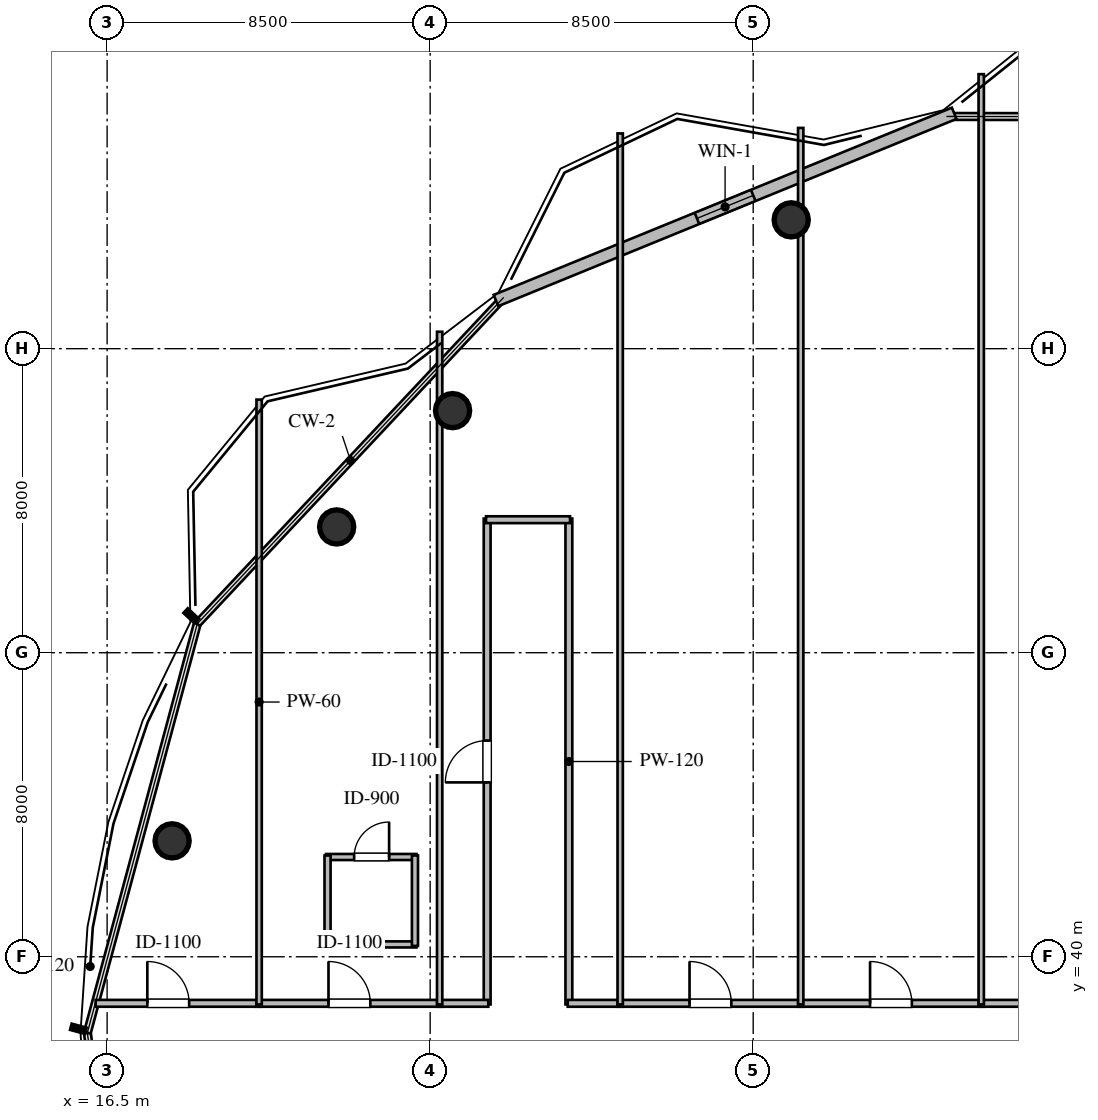
"""IFC4 building model, lengths in metres.
Left out: names, types, materials, properties, quantities, classifications, styles, units other than length and angle.
Written with IfcOpenShell. Run it as: python <this file> out.ifc"""

import sys

from ifc_helpers import new_model, si_unit, direction, frame, frame_2d, origin, origin_2d, place, context, subcontext, project, spatial, rectangle, circle, extrude, element, fill, save


model = new_model("IFC4")
c1 = context("Model", 3, precision=1e-05, world=origin(), true_north=direction((0.0, 1.0)))
c2 = subcontext(c1, "Body", "Model", "MODEL_VIEW")
j1 = project(units=[si_unit("LENGTHUNIT", "METRE"), si_unit("PLANEANGLEUNIT", "RADIAN")], contexts=[c1])
p1 = place(None, origin())
s1 = spatial("IfcSite", under=j1, at=p1, CompositionType="ELEMENT")
p2 = place(p1, origin())
s2 = spatial("IfcBuilding", under=s1, at=p2, CompositionType="ELEMENT")
p3 = place(p2, frame((0.0, 0.0, 266.2)))
s3 = spatial("IfcBuildingStorey", under=s2, at=p3, CompositionType="ELEMENT", Elevation=266.2)
for number, where, z_axis, x_axis in (
    (1, (34.5, 59.39, 0.0), (0.0, 0.0, 1.0), (1.0, 0.0, 0.0)),
    (2, (25.59, 54.37, 0.0), (0.0, 0.0, 1.0), (1.0, 0.0, 0.0)),
    (3, (22.54, 51.31, 0.0), (0.0, 0.0, 1.0), (1.0, 0.0, 0.0)),
    (4, (18.21, 43.05, 0.0), (0.0, 0.0, 1.0), (1.0, 0.0, 0.0)),
):
    element("IfcColumn", number, at=place(p3, frame(where, z_axis=z_axis, x_axis=x_axis)), inside=s3, PredefinedType="COLUMN", context=c2, shape_type="SweptSolid", body=[
        extrude(circle(Radius=0.45, at=origin_2d()), origin(), (0.0, 0.0, 1.0), 3.8),
    ])
p4 = place(p3, frame((26.732, 57.267, 0.0), z_axis=(0.0, 0.0, 1.0), x_axis=(0.925709313248, 0.37823572989, 0.0)))
e5 = element("IfcWall", 5, at=p4, inside=s3, PredefinedType="STANDARD", context=c2, shape_type="SweptSolid", body=[
    extrude(rectangle(XDim=13.024, YDim=0.32, at=frame_2d((6.512, 0.0))), origin(), (0.0, 0.0, 1.0), 3.56),
])
p5 = place(p4, frame((5.712, 0.0, 1.05)))
e6 = element("IfcOpeningElement", 6, at=p5, cuts=e5, PredefinedType="OPENING", context=c2, shape_type="SweptSolid", body=[
    extrude(rectangle(XDim=1.6, YDim=1.5, at=frame_2d((0.8, 0.75))), frame((0.0, 0.17, 0.0), z_axis=(0.0, -1.0, 0.0), x_axis=(1.0, 0.0, 0.0)), (0.0, 0.0, 1.0), 0.34),
])
p6 = place(p3, frame((22.26, 40.325, 0.0), z_axis=(0.0, 0.0, 1.0), x_axis=(1.0, 0.0, 0.0)))
e7 = element("IfcWall", 7, at=p6, inside=s3, PredefinedType="PLUMBINGWALL", context=c2, shape_type="SweptSolid", body=[
    extrude(rectangle(XDim=2.38, YDim=0.16, at=frame_2d((1.19, 0.0))), origin(), (0.0, 0.0, 1.0), 3.56),
])
p7 = place(p3, frame((22.26, 42.625, 0.0), z_axis=(0.0, 0.0, 1.0), x_axis=(1.0, 0.0, 0.0)))
e8 = element("IfcWall", 8, at=p7, inside=s3, PredefinedType="PLUMBINGWALL", context=c2, shape_type="SweptSolid", body=[
    extrude(rectangle(XDim=2.38, YDim=0.16, at=frame_2d((1.19, 0.0))), origin(), (0.0, 0.0, 1.0), 3.56),
])
p8 = place(p7, frame((0.74, 0.0, 0.0)))
e9 = element("IfcOpeningElement", 9, at=p8, cuts=e8, PredefinedType="OPENING", context=c2, shape_type="SweptSolid", body=[
    extrude(rectangle(XDim=0.92, YDim=2.1, at=frame_2d((0.46, 1.05))), frame((0.0, 0.09, 0.0), z_axis=(0.0, -1.0, 0.0), x_axis=(1.0, 0.0, 0.0)), (0.0, 0.0, 1.0), 0.18),
])
p9 = place(p3, frame((22.3, 40.285, 0.0), z_axis=(0.0, 0.0, 1.0), x_axis=(0.0, 1.0, 0.0)))
e10 = element("IfcWall", 10, at=p9, inside=s3, PredefinedType="PLUMBINGWALL", context=c2, shape_type="SweptSolid", body=[
    extrude(rectangle(XDim=2.38, YDim=0.16, at=frame_2d((1.19, 0.0))), origin(), (0.0, 0.0, 1.0), 3.006),
])
p10 = place(p3, frame((24.6, 40.285, 0.0), z_axis=(0.0, 0.0, 1.0), x_axis=(0.0, 1.0, 0.0)))
e11 = element("IfcWall", 11, at=p10, inside=s3, PredefinedType="PLUMBINGWALL", context=c2, shape_type="SweptSolid", body=[
    extrude(rectangle(XDim=2.38, YDim=0.16, at=frame_2d((1.19, 0.0))), origin(), (0.0, 0.0, 1.0), 3.56),
])
p11 = place(p3, frame((16.198, 38.775, 0.0), z_axis=(0.0, 0.0, 1.0), x_axis=(1.0, 0.0, 0.0)))
e12 = element("IfcWall", 12, at=p11, inside=s3, PredefinedType="PARTITIONING", context=c2, shape_type="SweptSolid", body=[
    extrude(rectangle(XDim=4.367, YDim=0.18, at=frame_2d((2.183, 0.0))), origin(), (0.0, 0.0, 1.0), 3.56),
])
p12 = place(p11, frame((1.36, 0.0, 0.0)))
e13 = element("IfcOpeningElement", 13, at=p12, cuts=e12, PredefinedType="OPENING", context=c2, shape_type="SweptSolid", body=[
    extrude(rectangle(XDim=1.1, YDim=2.1, at=frame_2d((0.55, 1.05))), frame((0.0, 0.1, 0.0), z_axis=(0.0, -1.0, 0.0), x_axis=(1.0, 0.0, 0.0)), (0.0, 0.0, 1.0), 0.2),
])
p13 = place(p3, frame((20.435, 38.775, 0.0), z_axis=(0.0, 0.0, 1.0), x_axis=(1.0, 0.0, 0.0)))
e14 = element("IfcWall", 14, at=p13, inside=s3, PredefinedType="PARTITIONING", context=c2, shape_type="SweptSolid", body=[
    extrude(rectangle(XDim=4.88, YDim=0.18, at=frame_2d((2.44, 0.0))), origin(), (0.0, 0.0, 1.0), 3.56),
])
p14 = place(p13, frame((1.89, 0.0, 0.0)))
e15 = element("IfcOpeningElement", 15, at=p14, cuts=e14, PredefinedType="OPENING", context=c2, shape_type="SweptSolid", body=[
    extrude(rectangle(XDim=1.1, YDim=2.1, at=frame_2d((0.55, 1.05))), frame((0.0, 0.1, 0.0), z_axis=(0.0, -1.0, 0.0), x_axis=(1.0, 0.0, 0.0)), (0.0, 0.0, 1.0), 0.2),
])
p15 = place(p3, frame((26.5, 38.745, 0.0), z_axis=(0.0, 0.0, 1.0), x_axis=(0.0, 1.0, 0.0)))
e16 = element("IfcWall", 16, at=p15, inside=s3, PredefinedType="PARTITIONING", context=c2, shape_type="SweptSolid", body=[
    extrude(rectangle(XDim=12.785, YDim=0.18, at=frame_2d((6.393, 0.0))), origin(), (0.0, 0.0, 1.0), 3.56),
])
p16 = place(p15, frame((5.843, 0.0, 0.0)))
e17 = element("IfcOpeningElement", 17, at=p16, cuts=e16, PredefinedType="OPENING", context=c2, shape_type="SweptSolid", body=[
    extrude(rectangle(XDim=1.1, YDim=2.1, at=frame_2d((0.55, 1.05))), frame((0.0, 0.1, 0.0), z_axis=(0.0, -1.0, 0.0), x_axis=(1.0, 0.0, 0.0)), (0.0, 0.0, 1.0), 0.2),
])
p17 = place(p3, frame((28.65, 51.53, 0.0), z_axis=(0.0, 0.0, 1.0), x_axis=(0.0, -1.0, 0.0)))
e18 = element("IfcWall", 18, at=p17, inside=s3, PredefinedType="PARTITIONING", context=c2, shape_type="SweptSolid", body=[
    extrude(rectangle(XDim=12.785, YDim=0.18, at=frame_2d((6.393, 0.0))), origin(), (0.0, 0.0, 1.0), 3.56),
])
p18 = place(p3, frame((26.47, 51.5, 0.0), z_axis=(0.0, 0.0, 1.0), x_axis=(1.0, 0.0, 0.0)))
e19 = element("IfcWall", 19, at=p18, inside=s3, PredefinedType="PARTITIONING", context=c2, shape_type="SweptSolid", body=[
    extrude(rectangle(XDim=2.21, YDim=0.18, at=frame_2d((1.105, 0.0))), origin(), (0.0, 0.0, 1.0), 3.56),
])
p19 = place(p3, frame((28.62, 38.775, 0.0), z_axis=(0.0, 0.0, 1.0), x_axis=(1.0, 0.0, 0.0)))
e20 = element("IfcWall", 20, at=p19, inside=s3, PredefinedType="PARTITIONING", context=c2, shape_type="SweptSolid", body=[
    extrude(rectangle(XDim=1.445, YDim=0.18, at=frame_2d((0.722, 0.0))), origin(), (0.0, 0.0, 1.0), 3.56),
])
p20 = place(p3, frame((25.185, 38.775, 0.0), z_axis=(0.0, 0.0, 1.0), x_axis=(1.0, 0.0, 0.0)))
e21 = element("IfcWall", 21, at=p20, inside=s3, PredefinedType="PARTITIONING", context=c2, shape_type="SweptSolid", body=[
    extrude(rectangle(XDim=1.345, YDim=0.18, at=frame_2d((0.672, 0.0))), origin(), (0.0, 0.0, 1.0), 3.56),
])
p21 = place(p3, frame((29.935, 38.775, 0.0), z_axis=(0.0, 0.0, 1.0), x_axis=(1.0, 0.0, 0.0)))
e22 = element("IfcWall", 22, at=p21, inside=s3, PredefinedType="PARTITIONING", context=c2, shape_type="SweptSolid", body=[
    extrude(rectangle(XDim=4.88, YDim=0.18, at=frame_2d((2.44, 0.0))), origin(), (0.0, 0.0, 1.0), 3.56),
])
p22 = place(p21, frame((1.89, 0.0, 0.0)))
e23 = element("IfcOpeningElement", 23, at=p22, cuts=e22, PredefinedType="OPENING", context=c2, shape_type="SweptSolid", body=[
    extrude(rectangle(XDim=1.1, YDim=2.1, at=frame_2d((0.55, 1.05))), frame((0.0, 0.1, 0.0), z_axis=(0.0, -1.0, 0.0), x_axis=(1.0, 0.0, 0.0)), (0.0, 0.0, 1.0), 0.2),
])
p23 = place(p3, frame((34.685, 38.775, 0.0), z_axis=(0.0, 0.0, 1.0), x_axis=(1.0, 0.0, 0.0)))
e24 = element("IfcWall", 24, at=p23, inside=s3, PredefinedType="PARTITIONING", context=c2, shape_type="SweptSolid", body=[
    extrude(rectangle(XDim=4.88, YDim=0.18, at=frame_2d((2.44, 0.0))), origin(), (0.0, 0.0, 1.0), 3.56),
])
p24 = place(p23, frame((1.89, 0.0, 0.0)))
e25 = element("IfcOpeningElement", 25, at=p24, cuts=e24, PredefinedType="OPENING", context=c2, shape_type="SweptSolid", body=[
    extrude(rectangle(XDim=1.1, YDim=2.1, at=frame_2d((0.55, 1.05))), frame((0.0, 0.1, 0.0), z_axis=(0.0, -1.0, 0.0), x_axis=(1.0, 0.0, 0.0)), (0.0, 0.0, 1.0), 0.2),
])
p25 = place(p3, frame((39.435, 38.775, 0.0), z_axis=(0.0, 0.0, 1.0), x_axis=(1.0, 0.0, 0.0)))
e26 = element("IfcWall", 26, at=p25, inside=s3, PredefinedType="PARTITIONING", context=c2, shape_type="SweptSolid", body=[
    extrude(rectangle(XDim=7.23, YDim=0.18, at=frame_2d((3.615, 0.0))), origin(), (0.0, 0.0, 1.0), 3.56),
])
p26 = place(p25, frame((3.065, 0.0, 0.0)))
e27 = element("IfcOpeningElement", 27, at=p26, cuts=e26, PredefinedType="OPENING", context=c2, shape_type="SweptSolid", body=[
    extrude(rectangle(XDim=1.1, YDim=2.1, at=frame_2d((0.55, 1.05))), frame((0.0, 0.1, 0.0), z_axis=(0.0, -1.0, 0.0), x_axis=(1.0, 0.0, 0.0)), (0.0, 0.0, 1.0), 0.2),
])
p27 = place(p3, frame((20.5, 54.66, 0.0), z_axis=(0.0, 0.0, 1.0), x_axis=(0.0, -1.0, 0.0)))
e28 = element("IfcWall", 28, at=p27, inside=s3, PredefinedType="PARTITIONING", context=c2, shape_type="SweptSolid", body=[
    extrude(rectangle(XDim=15.915, YDim=0.14, at=frame_2d((7.958, 0.0))), origin(), (0.0, 0.0, 1.0), 3.56),
])
p28 = place(p3, frame((25.25, 56.445, 0.0), z_axis=(0.0, 0.0, 1.0), x_axis=(0.0, -1.0, 0.0)))
e29 = element("IfcWall", 29, at=p28, inside=s3, PredefinedType="PARTITIONING", context=c2, shape_type="SweptSolid", body=[
    extrude(rectangle(XDim=17.7, YDim=0.14, at=frame_2d((8.85, 0.0))), origin(), (0.0, 0.0, 1.0), 3.006),
])
p29 = place(p3, frame((30.0, 61.664, 0.0), z_axis=(0.0, 0.0, 1.0), x_axis=(0.0, -1.0, 0.0)))
e30 = element("IfcWall", 30, at=p29, inside=s3, PredefinedType="PARTITIONING", context=c2, shape_type="SweptSolid", body=[
    extrude(rectangle(XDim=22.919, YDim=0.14, at=frame_2d((11.459, 0.0))), origin(), (0.0, 0.0, 1.0), 3.56),
])
p30 = place(p3, frame((34.75, 61.808, 0.0), z_axis=(0.0, 0.0, 1.0), x_axis=(0.0, -1.0, 0.0)))
e31 = element("IfcWall", 31, at=p30, inside=s3, PredefinedType="PARTITIONING", context=c2, shape_type="SweptSolid", body=[
    extrude(rectangle(XDim=23.063, YDim=0.14, at=frame_2d((11.531, 0.0))), origin(), (0.0, 0.0, 1.0), 3.006),
])
p31 = place(p3, frame((39.5, 63.223, 0.0), z_axis=(0.0, 0.0, 1.0), x_axis=(0.0, -1.0, 0.0)))
e32 = element("IfcWall", 32, at=p31, inside=s3, PredefinedType="PARTITIONING", context=c2, shape_type="SweptSolid", body=[
    extrude(rectangle(XDim=24.478, YDim=0.14, at=frame_2d((12.239, 0.0))), origin(), (0.0, 0.0, 1.0), 3.56),
])
p32 = place(p5, origin())
e33 = element("IfcWindow", 33, at=p32, inside=s3, PartitioningType="SINGLE_PANEL", PredefinedType="WINDOW", context=c2, shape_type="SweptSolid", body=[
    extrude(rectangle(XDim=1.6, YDim=1.5, at=frame_2d((0.8, 0.75))), frame((0.0, 0.03, 0.0), z_axis=(0.0, -1.0, 0.0), x_axis=(1.0, 0.0, 0.0)), (0.0, 0.0, 1.0), 0.06),
])
fill(e6, e33)
p33 = place(p8, origin())
e34 = element("IfcDoor", 34, at=p33, inside=s3, OperationType="SINGLE_SWING_RIGHT", PredefinedType="DOOR", context=c2, shape_type="SweptSolid", body=[
    extrude(rectangle(XDim=0.92, YDim=2.1, at=frame_2d((0.46, 1.05))), frame((0.0, 0.025, 0.0), z_axis=(0.0, -1.0, 0.0), x_axis=(1.0, 0.0, 0.0)), (0.0, 0.0, 1.0), 0.05),
])
fill(e9, e34)
p34 = place(p12, origin())
e35 = element("IfcDoor", 35, at=p34, inside=s3, OperationType="SINGLE_SWING_LEFT", PredefinedType="DOOR", context=c2, shape_type="SweptSolid", body=[
    extrude(rectangle(XDim=1.1, YDim=2.1, at=frame_2d((0.55, 1.05))), frame((0.0, 0.025, 0.0), z_axis=(0.0, -1.0, 0.0), x_axis=(1.0, 0.0, 0.0)), (0.0, 0.0, 1.0), 0.05),
])
fill(e13, e35)
p35 = place(p14, origin())
e36 = element("IfcDoor", 36, at=p35, inside=s3, OperationType="SINGLE_SWING_LEFT", PredefinedType="DOOR", context=c2, shape_type="SweptSolid", body=[
    extrude(rectangle(XDim=1.1, YDim=2.1, at=frame_2d((0.55, 1.05))), frame((0.0, 0.025, 0.0), z_axis=(0.0, -1.0, 0.0), x_axis=(1.0, 0.0, 0.0)), (0.0, 0.0, 1.0), 0.05),
])
fill(e15, e36)
p36 = place(p16, origin())
e37 = element("IfcDoor", 37, at=p36, inside=s3, OperationType="SINGLE_SWING_LEFT", PredefinedType="DOOR", context=c2, shape_type="SweptSolid", body=[
    extrude(rectangle(XDim=1.1, YDim=2.1, at=frame_2d((0.55, 1.05))), frame((0.0, 0.025, 0.0), z_axis=(0.0, -1.0, 0.0), x_axis=(1.0, 0.0, 0.0)), (0.0, 0.0, 1.0), 0.05),
])
fill(e17, e37)
p37 = place(p22, origin())
e38 = element("IfcDoor", 38, at=p37, inside=s3, OperationType="SINGLE_SWING_LEFT", PredefinedType="DOOR", context=c2, shape_type="SweptSolid", body=[
    extrude(rectangle(XDim=1.1, YDim=2.1, at=frame_2d((0.55, 1.05))), frame((0.0, 0.025, 0.0), z_axis=(0.0, -1.0, 0.0), x_axis=(1.0, 0.0, 0.0)), (0.0, 0.0, 1.0), 0.05),
])
fill(e23, e38)
p38 = place(p24, origin())
e39 = element("IfcDoor", 39, at=p38, inside=s3, OperationType="SINGLE_SWING_LEFT", PredefinedType="DOOR", context=c2, shape_type="SweptSolid", body=[
    extrude(rectangle(XDim=1.1, YDim=2.1, at=frame_2d((0.55, 1.05))), frame((0.0, 0.025, 0.0), z_axis=(0.0, -1.0, 0.0), x_axis=(1.0, 0.0, 0.0)), (0.0, 0.0, 1.0), 0.05),
])
fill(e25, e39)
save(model, sys.argv[1])
